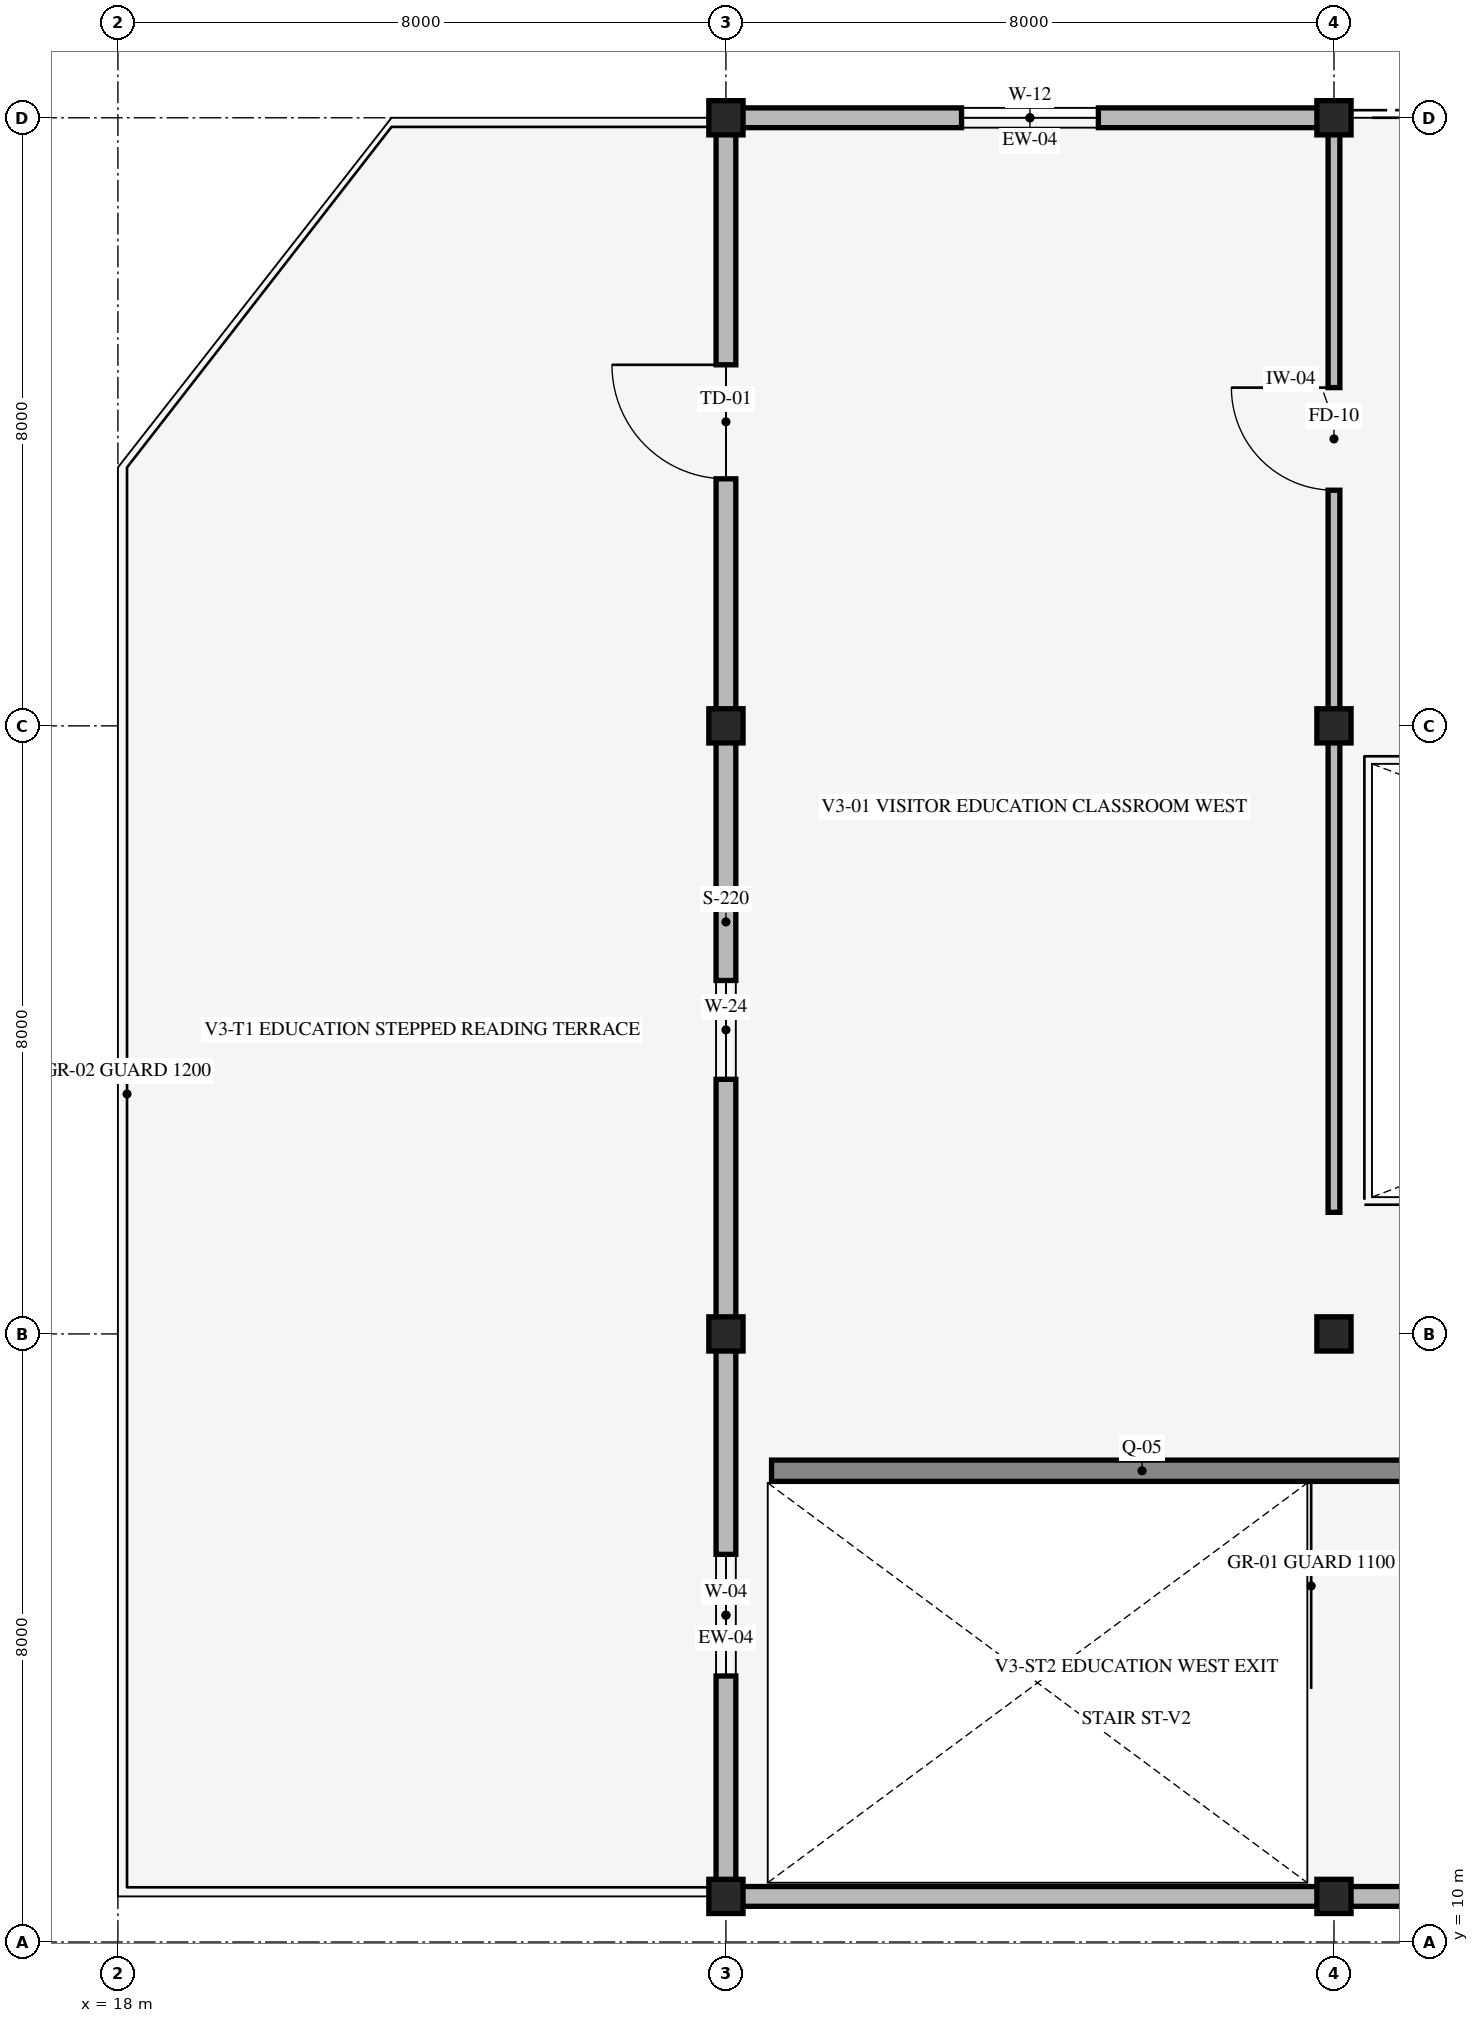
"""IFC4 building model, lengths in metres.
Left out: names, types, materials, properties, quantities, classifications, styles, units other than length and angle.
Written with IfcOpenShell. Run it as: python <this file> out.ifc"""

import sys

from ifc_helpers import new_model, si_unit, direction, frame, frame_2d, origin, origin_2d, place, context, subcontext, project, spatial, rectangle, extrude, element, fill, save


model = new_model("IFC4")
c1 = context("Model", 3, precision=1e-05, world=origin(), true_north=direction((0.0, 1.0)))
c2 = subcontext(c1, "Body", "Model", "MODEL_VIEW")
j1 = project(units=[si_unit("LENGTHUNIT", "METRE"), si_unit("PLANEANGLEUNIT", "RADIAN")], contexts=[c1])
p1 = place(None, origin())
s1 = spatial("IfcSite", under=j1, at=p1, CompositionType="ELEMENT")
p2 = place(p1, origin())
s2 = spatial("IfcBuilding", under=s1, at=p2, CompositionType="ELEMENT")
p3 = place(p2, frame((0.0, 0.0, 10.2)))
s3 = spatial("IfcBuildingStorey", under=s2, at=p3, CompositionType="ELEMENT", Elevation=10.2)
for number, where, z_axis, x_axis in (
    (1, (26.0, 10.6, 0.0), (0.0, 0.0, 1.0), (1.0, 0.0, 0.0)),
    (2, (26.0, 18.0, 0.0), (0.0, 0.0, 1.0), (1.0, 0.0, 0.0)),
    (3, (26.0, 26.0, 0.0), (0.0, 0.0, 1.0), (1.0, 0.0, 0.0)),
    (4, (26.0, 34.0, 0.0), (0.0, 0.0, 1.0), (1.0, 0.0, 0.0)),
    (5, (34.0, 10.6, 0.0), (0.0, 0.0, 1.0), (1.0, 0.0, 0.0)),
    (6, (34.0, 18.0, 0.0), (0.0, 0.0, 1.0), (1.0, 0.0, 0.0)),
    (7, (34.0, 26.0, 0.0), (0.0, 0.0, 1.0), (1.0, 0.0, 0.0)),
    (8, (34.0, 34.0, 0.0), (0.0, 0.0, 1.0), (1.0, 0.0, 0.0)),
):
    element("IfcColumn", number, at=place(p3, frame(where, z_axis=z_axis, x_axis=x_axis)), inside=s3, PredefinedType="COLUMN", context=c2, shape_type="SweptSolid", body=[
        extrude(rectangle(XDim=0.45, YDim=0.45, at=origin_2d()), origin(), (0.0, 0.0, 1.0), 4.8),
    ])
p4 = place(p3, frame((42.0, 10.6, 0.0), z_axis=(0.0, 0.0, 1.0), x_axis=(-1.0, 0.0, 0.0)))
e9 = element("IfcWall", 9, at=p4, inside=s3, PredefinedType="STANDARD", context=c2, shape_type="SweptSolid", body=[
    extrude(rectangle(XDim=8.0, YDim=0.26, at=frame_2d((4.0, 0.0))), origin(), (0.0, 0.0, 1.0), 4.01),
])
p5 = place(p4, frame((0.65, 0.0, 0.85)))
e10 = element("IfcOpeningElement", 10, at=p5, cuts=e9, PredefinedType="OPENING", context=c2, shape_type="SweptSolid", body=[
    extrude(rectangle(XDim=1.9, YDim=1.3, at=frame_2d((0.95, 0.65))), frame((0.0, 0.14, 0.0), z_axis=(0.0, -1.0, 0.0), x_axis=(1.0, 0.0, 0.0)), (0.0, 0.0, 1.0), 0.28),
])
p6 = place(p3, frame((34.0, 10.6, 0.0), z_axis=(0.0, 0.0, 1.0), x_axis=(-1.0, 0.0, 0.0)))
e11 = element("IfcWall", 11, at=p6, inside=s3, PredefinedType="STANDARD", context=c2, shape_type="SweptSolid", body=[
    extrude(rectangle(XDim=8.0, YDim=0.26, at=frame_2d((4.0, 0.0))), origin(), (0.0, 0.0, 1.0), 4.01),
])
p7 = place(p3, frame((26.0, 10.6, 0.0), z_axis=(0.0, 0.0, 1.0), x_axis=(0.0, 1.0, 0.0)))
e12 = element("IfcWall", 12, at=p7, inside=s3, PredefinedType="STANDARD", context=c2, shape_type="SweptSolid", body=[
    extrude(rectangle(XDim=7.4, YDim=0.26, at=frame_2d((3.7, 0.0))), origin(), (0.0, 0.0, 1.0), 4.01),
])
p8 = place(p7, frame((2.9, 0.0, 0.85)))
e13 = element("IfcOpeningElement", 13, at=p8, cuts=e12, PredefinedType="OPENING", context=c2, shape_type="SweptSolid", body=[
    extrude(rectangle(XDim=1.6, YDim=1.2, at=frame_2d((0.8, 0.6))), frame((0.0, 0.14, 0.0), z_axis=(0.0, -1.0, 0.0), x_axis=(1.0, 0.0, 0.0)), (0.0, 0.0, 1.0), 0.28),
])
p9 = place(p3, frame((26.0, 18.0, 0.0), z_axis=(0.0, 0.0, 1.0), x_axis=(0.0, 1.0, 0.0)))
e14 = element("IfcWall", 14, at=p9, inside=s3, PredefinedType="STANDARD", context=c2, shape_type="SweptSolid", body=[
    extrude(rectangle(XDim=8.0, YDim=0.26, at=frame_2d((4.0, 0.0))), origin(), (0.0, 0.0, 1.0), 4.01),
])
p10 = place(p9, frame((3.35, 0.0, 0.85)))
e15 = element("IfcOpeningElement", 15, at=p10, cuts=e14, PredefinedType="OPENING", context=c2, shape_type="SweptSolid", body=[
    extrude(rectangle(XDim=1.3, YDim=1.7, at=frame_2d((0.65, 0.85))), frame((0.0, 0.14, 0.0), z_axis=(0.0, -1.0, 0.0), x_axis=(1.0, 0.0, 0.0)), (0.0, 0.0, 1.0), 0.28),
])
p11 = place(p3, frame((26.0, 26.0, 0.0), z_axis=(0.0, 0.0, 1.0), x_axis=(0.0, 1.0, 0.0)))
e16 = element("IfcWall", 16, at=p11, inside=s3, PredefinedType="STANDARD", context=c2, shape_type="SweptSolid", body=[
    extrude(rectangle(XDim=8.0, YDim=0.26, at=frame_2d((4.0, 0.0))), origin(), (0.0, 0.0, 1.0), 4.01),
])
p12 = place(p11, frame((3.25, 0.0, 0.0)))
e17 = element("IfcOpeningElement", 17, at=p12, cuts=e16, PredefinedType="OPENING", context=c2, shape_type="SweptSolid", body=[
    extrude(rectangle(XDim=1.5, YDim=2.25, at=frame_2d((0.75, 1.125))), frame((0.0, 0.14, 0.0), z_axis=(0.0, -1.0, 0.0), x_axis=(1.0, 0.0, 0.0)), (0.0, 0.0, 1.0), 0.28),
])
p13 = place(p3, frame((26.0, 34.0, 0.0), z_axis=(0.0, 0.0, 1.0), x_axis=(1.0, 0.0, 0.0)))
e18 = element("IfcWall", 18, at=p13, inside=s3, PredefinedType="STANDARD", context=c2, shape_type="SweptSolid", body=[
    extrude(rectangle(XDim=8.0, YDim=0.26, at=frame_2d((4.0, 0.0))), origin(), (0.0, 0.0, 1.0), 4.01),
])
p14 = place(p13, frame((3.1, 0.0, 0.85)))
e19 = element("IfcOpeningElement", 19, at=p14, cuts=e18, PredefinedType="OPENING", context=c2, shape_type="SweptSolid", body=[
    extrude(rectangle(XDim=1.8, YDim=2.4, at=frame_2d((0.9, 1.2))), frame((0.0, 0.14, 0.0), z_axis=(0.0, -1.0, 0.0), x_axis=(1.0, 0.0, 0.0)), (0.0, 0.0, 1.0), 0.28),
])
p15 = place(p3, frame((26.6, 16.2, 0.0), z_axis=(0.0, 0.0, 1.0), x_axis=(1.0, 0.0, 0.0)))
e20 = element("IfcWall", 20, at=p15, inside=s3, PredefinedType="SHEAR", context=c2, shape_type="SweptSolid", body=[
    extrude(rectangle(XDim=9.75, YDim=0.28, at=frame_2d((4.875, 0.0))), origin(), (0.0, 0.0, 1.0), 4.4),
])
p16 = place(p3, frame((34.0, 19.6, 0.0), z_axis=(0.0, 0.0, 1.0), x_axis=(0.0, 1.0, 0.0)))
e21 = element("IfcWall", 21, at=p16, inside=s3, PredefinedType="STANDARD", context=c2, shape_type="SweptSolid", body=[
    extrude(rectangle(XDim=14.35, YDim=0.155, at=frame_2d((7.175, 0.0))), origin(), (0.0, 0.0, 1.0), 4.38),
])
p17 = place(p16, frame((9.5, 0.0, 0.0)))
e22 = element("IfcOpeningElement", 22, at=p17, cuts=e21, PredefinedType="OPENING", context=c2, shape_type="SweptSolid", body=[
    extrude(rectangle(XDim=1.35, YDim=2.15, at=frame_2d((0.675, 1.075))), frame((0.0, 0.087, 0.0), z_axis=(0.0, -1.0, 0.0), x_axis=(1.0, 0.0, 0.0)), (0.0, 0.0, 1.0), 0.175),
])
p18 = place(p8, origin())
e23 = element("IfcWindow", 23, at=p18, inside=s3, PartitioningType="SINGLE_PANEL", PredefinedType="WINDOW", context=c2, shape_type="SweptSolid", body=[
    extrude(rectangle(XDim=1.6, YDim=1.2, at=frame_2d((0.8, 0.6))), frame((0.0, 0.03, 0.0), z_axis=(0.0, -1.0, 0.0), x_axis=(1.0, 0.0, 0.0)), (0.0, 0.0, 1.0), 0.06),
])
fill(e13, e23)
p19 = place(p10, origin())
e24 = element("IfcWindow", 24, at=p19, inside=s3, PartitioningType="SINGLE_PANEL", PredefinedType="WINDOW", context=c2, shape_type="SweptSolid", body=[
    extrude(rectangle(XDim=1.3, YDim=1.7, at=frame_2d((0.65, 0.85))), frame((0.0, 0.03, 0.0), z_axis=(0.0, -1.0, 0.0), x_axis=(1.0, 0.0, 0.0)), (0.0, 0.0, 1.0), 0.06),
])
fill(e15, e24)
p20 = place(p12, origin())
e25 = element("IfcDoor", 25, at=p20, inside=s3, OperationType="SINGLE_SWING_RIGHT", PredefinedType="DOOR", context=c2, shape_type="SweptSolid", body=[
    extrude(rectangle(XDim=1.5, YDim=2.25, at=frame_2d((0.75, 1.125))), frame((0.0, 0.025, 0.0), z_axis=(0.0, -1.0, 0.0), x_axis=(1.0, 0.0, 0.0)), (0.0, 0.0, 1.0), 0.05),
])
fill(e17, e25)
p21 = place(p14, origin())
e26 = element("IfcWindow", 26, at=p21, inside=s3, PartitioningType="SINGLE_PANEL", PredefinedType="WINDOW", context=c2, shape_type="SweptSolid", body=[
    extrude(rectangle(XDim=1.8, YDim=2.4, at=frame_2d((0.9, 1.2))), frame((0.0, 0.03, 0.0), z_axis=(0.0, -1.0, 0.0), x_axis=(1.0, 0.0, 0.0)), (0.0, 0.0, 1.0), 0.06),
])
fill(e19, e26)
p22 = place(p17, origin())
e27 = element("IfcDoor", 27, at=p22, inside=s3, OperationType="SINGLE_SWING_RIGHT", PredefinedType="DOOR", context=c2, shape_type="SweptSolid", body=[
    extrude(rectangle(XDim=1.35, YDim=2.15, at=frame_2d((0.675, 1.075))), frame((0.0, 0.025, 0.0), z_axis=(0.0, -1.0, 0.0), x_axis=(1.0, 0.0, 0.0)), (0.0, 0.0, 1.0), 0.05),
])
fill(e22, e27)
save(model, sys.argv[1])
